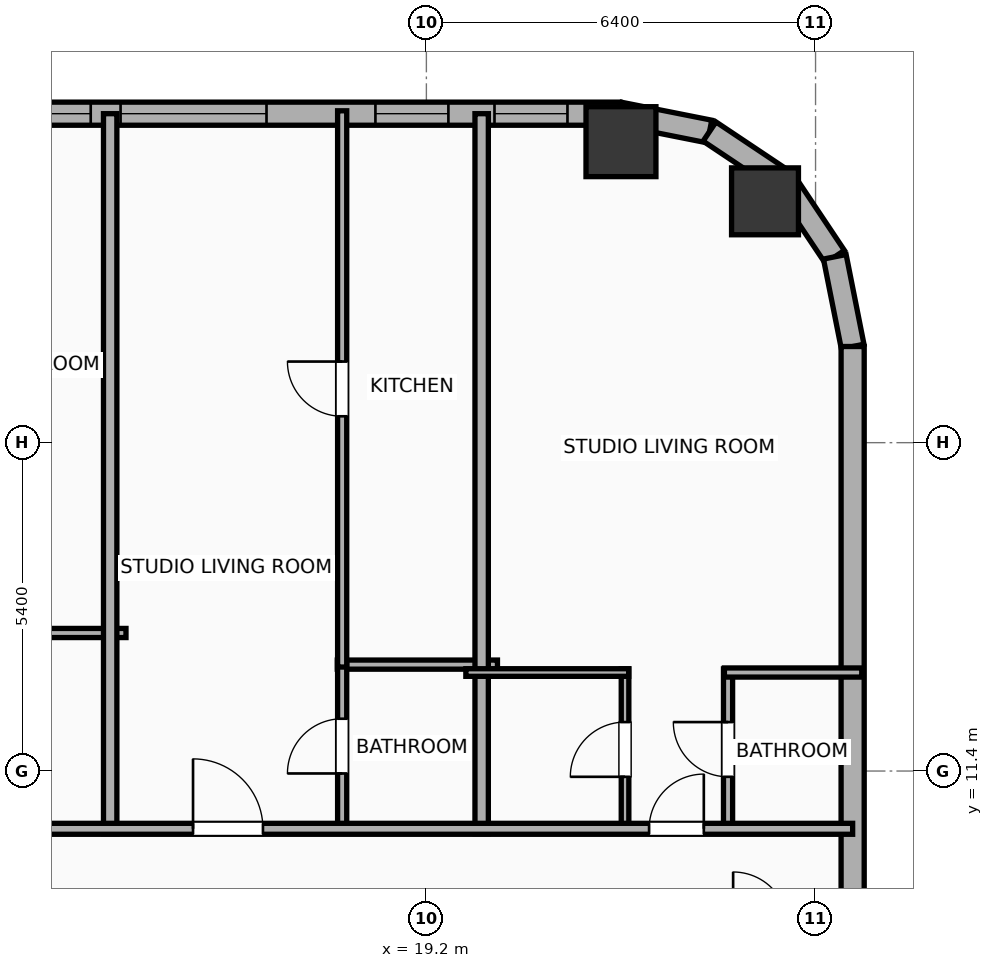
"""IFC4 building model, lengths in metres.
Left out: names, types, materials, properties, quantities, classifications, styles, units other than length and angle.
Written with IfcOpenShell. Run it as: python <this file> out.ifc"""

import sys

from ifc_helpers import new_model, si_unit, direction, frame, frame_2d, origin, origin_2d, place, context, subcontext, project, spatial, rectangle, hollow_rectangle, hollow_circle, extrude, element, fill, save


model = new_model("IFC4")
c1 = context("Model", 3, precision=1e-05, world=origin(), true_north=direction((0.0, 1.0)))
c2 = subcontext(c1, "Body", "Model", "MODEL_VIEW")
j1 = project(units=[si_unit("LENGTHUNIT", "METRE"), si_unit("PLANEANGLEUNIT", "RADIAN")], contexts=[c1])
p1 = place(None, origin())
s1 = spatial("IfcSite", under=j1, at=p1, CompositionType="ELEMENT")
p2 = place(p1, origin())
s2 = spatial("IfcBuilding", under=s1, at=p2, CompositionType="ELEMENT")
p3 = place(p2, frame((0.0, 0.0, 72.8)))
s3 = spatial("IfcBuildingStorey", under=s2, at=p3, CompositionType="ELEMENT", Elevation=72.8)
p4 = place(p3, frame((24.769, 20.769, 0.0), z_axis=(0.0, 0.0, 1.0), x_axis=(1.0, 0.0, 0.0)))
e1 = element("IfcColumn", 1, at=p4, inside=s3, PredefinedType="COLUMN", context=c2, shape_type="SweptSolid", body=[
    extrude(hollow_circle(Radius=0.55, WallThickness=0.036, at=origin_2d()), origin(), (0.0, 0.0, 1.0), 3.9),
])
p5 = place(p3, frame((22.4, 21.75, 0.0), z_axis=(0.0, 0.0, 1.0), x_axis=(1.0, 0.0, 0.0)))
e2 = element("IfcColumn", 2, at=p5, inside=s3, PredefinedType="COLUMN", context=c2, shape_type="SweptSolid", body=[
    extrude(hollow_rectangle(XDim=1.15, YDim=1.15, WallThickness=0.04, at=origin_2d()), origin(), (0.0, 0.0, 1.0), 3.9),
])
p6 = place(p3, frame((-29.581, 22.21, 0.0), z_axis=(0.0, 0.0, 1.0), x_axis=(1.0, 0.0, 0.0)))
e3 = element("IfcWall", 3, at=p6, inside=s3, PredefinedType="ELEMENTEDWALL", context=c2, shape_type="SweptSolid", body=[
    extrude(rectangle(XDim=51.963, YDim=0.38, at=frame_2d((25.981, 0.0))), origin(), (0.0, 0.0, 1.0), 3.65),
])
p7 = place(p6, frame((5.81, 0.0, 0.75)))
e4 = element("IfcOpeningElement", 4, at=p7, cuts=e3, PredefinedType="OPENING", context=c2, shape_type="SweptSolid", body=[
    extrude(rectangle(XDim=2.4, YDim=2.1, at=frame_2d((1.2, 1.05))), frame((0.0, 0.2, 0.0), z_axis=(0.0, -1.0, 0.0), x_axis=(1.0, 0.0, 0.0)), (0.0, 0.0, 1.0), 0.4),
])
p8 = place(p6, frame((23.131, 0.0, 0.75)))
e5 = element("IfcOpeningElement", 5, at=p8, cuts=e3, PredefinedType="OPENING", context=c2, shape_type="SweptSolid", body=[
    extrude(rectangle(XDim=2.4, YDim=2.1, at=frame_2d((1.2, 1.05))), frame((0.0, 0.2, 0.0), z_axis=(0.0, -1.0, 0.0), x_axis=(1.0, 0.0, 0.0)), (0.0, 0.0, 1.0), 0.4),
])
p9 = place(p6, frame((43.752, 0.0, 0.75)))
e6 = element("IfcOpeningElement", 6, at=p9, cuts=e3, PredefinedType="OPENING", context=c2, shape_type="SweptSolid", body=[
    extrude(rectangle(XDim=2.4, YDim=2.1, at=frame_2d((1.2, 1.05))), frame((0.0, 0.2, 0.0), z_axis=(0.0, -1.0, 0.0), x_axis=(1.0, 0.0, 0.0)), (0.0, 0.0, 1.0), 0.4),
])
p10 = place(p6, frame((2.819, 0.0, 0.75)))
e7 = element("IfcOpeningElement", 7, at=p10, cuts=e3, PredefinedType="OPENING", context=c2, shape_type="SweptSolid", body=[
    extrude(rectangle(XDim=1.2, YDim=2.05, at=frame_2d((0.6, 1.025))), frame((0.0, 0.2, 0.0), z_axis=(0.0, -1.0, 0.0), x_axis=(1.0, 0.0, 0.0)), (0.0, 0.0, 1.0), 0.4),
])
p11 = place(p6, frame((11.781, 0.0, 0.75)))
e8 = element("IfcOpeningElement", 8, at=p11, cuts=e3, PredefinedType="OPENING", context=c2, shape_type="SweptSolid", body=[
    extrude(rectangle(XDim=1.2, YDim=2.05, at=frame_2d((0.6, 1.025))), frame((0.0, 0.2, 0.0), z_axis=(0.0, -1.0, 0.0), x_axis=(1.0, 0.0, 0.0)), (0.0, 0.0, 1.0), 0.4),
])
p12 = place(p6, frame((8.781, 0.0, 0.75)))
e9 = element("IfcOpeningElement", 9, at=p12, cuts=e3, PredefinedType="OPENING", context=c2, shape_type="SweptSolid", body=[
    extrude(rectangle(XDim=0.85, YDim=2.05, at=frame_2d((0.425, 1.025))), frame((0.0, 0.2, 0.0), z_axis=(0.0, -1.0, 0.0), x_axis=(1.0, 0.0, 0.0)), (0.0, 0.0, 1.0), 0.4),
])
p13 = place(p6, frame((14.876, 0.0, 0.75)))
e10 = element("IfcOpeningElement", 10, at=p13, cuts=e3, PredefinedType="OPENING", context=c2, shape_type="SweptSolid", body=[
    extrude(rectangle(XDim=1.2, YDim=2.05, at=frame_2d((0.6, 1.025))), frame((0.0, 0.2, 0.0), z_axis=(0.0, -1.0, 0.0), x_axis=(1.0, 0.0, 0.0)), (0.0, 0.0, 1.0), 0.4),
])
p14 = place(p6, frame((21.521, 0.0, 0.75)))
e11 = element("IfcOpeningElement", 11, at=p14, cuts=e3, PredefinedType="OPENING", context=c2, shape_type="SweptSolid", body=[
    extrude(rectangle(XDim=0.52, YDim=2.05, at=frame_2d((0.26, 1.025))), frame((0.0, 0.2, 0.0), z_axis=(0.0, -1.0, 0.0), x_axis=(1.0, 0.0, 0.0)), (0.0, 0.0, 1.0), 0.4),
])
p15 = place(p6, frame((17.886, 0.0, 0.75)))
e12 = element("IfcOpeningElement", 12, at=p15, cuts=e3, PredefinedType="OPENING", context=c2, shape_type="SweptSolid", body=[
    extrude(rectangle(XDim=1.2, YDim=2.05, at=frame_2d((0.6, 1.025))), frame((0.0, 0.2, 0.0), z_axis=(0.0, -1.0, 0.0), x_axis=(1.0, 0.0, 0.0)), (0.0, 0.0, 1.0), 0.4),
])
p16 = place(p6, frame((26.736, 0.0, 0.75)))
e13 = element("IfcOpeningElement", 13, at=p16, cuts=e3, PredefinedType="OPENING", context=c2, shape_type="SweptSolid", body=[
    extrude(rectangle(XDim=1.2, YDim=2.05, at=frame_2d((0.6, 1.025))), frame((0.0, 0.2, 0.0), z_axis=(0.0, -1.0, 0.0), x_axis=(1.0, 0.0, 0.0)), (0.0, 0.0, 1.0), 0.4),
])
p17 = place(p6, frame((31.976, 0.0, 0.75)))
e14 = element("IfcOpeningElement", 14, at=p17, cuts=e3, PredefinedType="OPENING", context=c2, shape_type="SweptSolid", body=[
    extrude(rectangle(XDim=1.2, YDim=2.05, at=frame_2d((0.6, 1.025))), frame((0.0, 0.2, 0.0), z_axis=(0.0, -1.0, 0.0), x_axis=(1.0, 0.0, 0.0)), (0.0, 0.0, 1.0), 0.4),
])
p18 = place(p6, frame((38.181, 0.0, 0.75)))
e15 = element("IfcOpeningElement", 15, at=p18, cuts=e3, PredefinedType="OPENING", context=c2, shape_type="SweptSolid", body=[
    extrude(rectangle(XDim=1.2, YDim=2.05, at=frame_2d((0.6, 1.025))), frame((0.0, 0.2, 0.0), z_axis=(0.0, -1.0, 0.0), x_axis=(1.0, 0.0, 0.0)), (0.0, 0.0, 1.0), 0.4),
])
p19 = place(p6, frame((35.486, 0.0, 0.75)))
e16 = element("IfcOpeningElement", 16, at=p19, cuts=e3, PredefinedType="OPENING", context=c2, shape_type="SweptSolid", body=[
    extrude(rectangle(XDim=1.2, YDim=2.05, at=frame_2d((0.6, 1.025))), frame((0.0, 0.2, 0.0), z_axis=(0.0, -1.0, 0.0), x_axis=(1.0, 0.0, 0.0)), (0.0, 0.0, 1.0), 0.4),
])
p20 = place(p6, frame((42.411, 0.0, 0.75)))
e17 = element("IfcOpeningElement", 17, at=p20, cuts=e3, PredefinedType="OPENING", context=c2, shape_type="SweptSolid", body=[
    extrude(rectangle(XDim=0.85, YDim=2.05, at=frame_2d((0.425, 1.025))), frame((0.0, 0.2, 0.0), z_axis=(0.0, -1.0, 0.0), x_axis=(1.0, 0.0, 0.0)), (0.0, 0.0, 1.0), 0.4),
])
p21 = place(p6, frame((47.943, 0.0, 0.75)))
e18 = element("IfcOpeningElement", 18, at=p21, cuts=e3, PredefinedType="OPENING", context=c2, shape_type="SweptSolid", body=[
    extrude(rectangle(XDim=1.2, YDim=2.05, at=frame_2d((0.6, 1.025))), frame((0.0, 0.2, 0.0), z_axis=(0.0, -1.0, 0.0), x_axis=(1.0, 0.0, 0.0)), (0.0, 0.0, 1.0), 0.4),
])
p22 = place(p6, frame((49.901, 0.0, 0.75)))
e19 = element("IfcOpeningElement", 19, at=p22, cuts=e3, PredefinedType="OPENING", context=c2, shape_type="SweptSolid", body=[
    extrude(rectangle(XDim=1.2, YDim=2.05, at=frame_2d((0.6, 1.025))), frame((0.0, 0.2, 0.0), z_axis=(0.0, -1.0, 0.0), x_axis=(1.0, 0.0, 0.0)), (0.0, 0.0, 1.0), 0.4),
])
p23 = place(p3, frame((22.381, 22.21, 0.0), z_axis=(0.0, 0.0, 1.0), x_axis=(0.980786132421, -0.195086038585, 0.0)))
e20 = element("IfcWall", 20, at=p23, inside=s3, PredefinedType="ELEMENTEDWALL", context=c2, shape_type="SweptSolid", body=[
    extrude(rectangle(XDim=1.504, YDim=0.38, at=frame_2d((0.752, 0.0))), origin(), (0.0, 0.0, 1.0), 3.65),
])
for number, where, z_axis, x_axis in (
    (21, (23.857, 21.917, 0.0), (0.0, 0.0, 1.0), (0.831, -0.556, 0.0)),
    (22, (25.091, 21.091, 0.0), (0.0, 0.0, 1.0), (0.556, -0.831, 0.0)),
):
    element("IfcWall", number, at=place(p3, frame(where, z_axis=z_axis, x_axis=x_axis)), inside=s3, PredefinedType="ELEMENTEDWALL", context=c2, shape_type="SweptSolid", body=[
        extrude(rectangle(XDim=1.485, YDim=0.38, at=frame_2d((0.743, 0.0))), origin(), (0.0, 0.0, 1.0), 3.65),
    ])
p24 = place(p3, frame((25.917, 19.857, 0.0), z_axis=(0.0, 0.0, 1.0), x_axis=(0.195086038585, -0.980786132421, 0.0)))
e23 = element("IfcWall", 23, at=p24, inside=s3, PredefinedType="ELEMENTEDWALL", context=c2, shape_type="SweptSolid", body=[
    extrude(rectangle(XDim=1.504, YDim=0.38, at=frame_2d((0.752, 0.0))), origin(), (0.0, 0.0, 1.0), 3.65),
])
p25 = place(p3, frame((26.21, 18.381, 0.0), z_axis=(0.0, 0.0, 1.0), x_axis=(0.0, -1.0, 0.0)))
e24 = element("IfcWall", 24, at=p25, inside=s3, PredefinedType="ELEMENTEDWALL", context=c2, shape_type="SweptSolid", body=[
    extrude(rectangle(XDim=36.763, YDim=0.38, at=frame_2d((18.381, 0.0))), origin(), (0.0, 0.0, 1.0), 3.65),
])
p26 = place(p25, frame((33.362, 0.0, 0.75)))
e25 = element("IfcOpeningElement", 25, at=p26, cuts=e24, PredefinedType="OPENING", context=c2, shape_type="SweptSolid", body=[
    extrude(rectangle(XDim=1.2, YDim=2.05, at=frame_2d((0.6, 1.025))), frame((0.0, 0.2, 0.0), z_axis=(0.0, -1.0, 0.0), x_axis=(1.0, 0.0, 0.0)), (0.0, 0.0, 1.0), 0.4),
])
p27 = place(p3, frame((10.47, 13.67, 0.0), z_axis=(0.0, 0.0, 1.0), x_axis=(1.0, 0.0, 0.0)))
e26 = element("IfcWall", 26, at=p27, inside=s3, PredefinedType="PLUMBINGWALL", context=c2, shape_type="SweptSolid", body=[
    extrude(rectangle(XDim=3.79, YDim=0.15, at=frame_2d((1.895, 0.0))), origin(), (0.0, 0.0, 1.0), 3.65),
])
p28 = place(p3, frame((14.0, 10.37, 0.0), z_axis=(0.0, 0.0, 1.0), x_axis=(0.0, 1.0, 0.0)))
e27 = element("IfcWall", 27, at=p28, inside=s3, PredefinedType="PARTITIONING", context=c2, shape_type="SweptSolid", body=[
    extrude(rectangle(XDim=11.84, YDim=0.22, at=frame_2d((5.92, 0.0))), origin(), (0.0, 0.0, 1.0), 3.65),
])
p29 = place(p3, frame((17.735, 13.15, 0.0), z_axis=(0.0, 0.0, 1.0), x_axis=(1.0, 0.0, 0.0)))
e28 = element("IfcWall", 28, at=p29, inside=s3, PredefinedType="PLUMBINGWALL", context=c2, shape_type="SweptSolid", body=[
    extrude(rectangle(XDim=2.634, YDim=0.15, at=frame_2d((1.317, 0.0))), origin(), (0.0, 0.0, 1.0), 3.65),
])
p30 = place(p3, frame((17.815, 10.43, 0.0), z_axis=(0.0, 0.0, 1.0), x_axis=(0.0, 1.0, 0.0)))
e29 = element("IfcWall", 29, at=p30, inside=s3, PredefinedType="PLUMBINGWALL", context=c2, shape_type="SweptSolid", body=[
    extrude(rectangle(XDim=2.76, YDim=0.15, at=frame_2d((1.38, 0.0))), origin(), (0.0, 0.0, 1.0), 3.65),
])
p31 = place(p30, frame((0.93, 0.0, 0.0)))
e30 = element("IfcOpeningElement", 30, at=p31, cuts=e29, PredefinedType="OPENING", context=c2, shape_type="SweptSolid", body=[
    extrude(rectangle(XDim=0.9, YDim=2.05, at=frame_2d((0.45, 1.025))), frame((0.0, 0.085, 0.0), z_axis=(0.0, -1.0, 0.0), x_axis=(1.0, 0.0, 0.0)), (0.0, 0.0, 1.0), 0.17),
])
p32 = place(p3, frame((17.815, 13.11, 0.0), z_axis=(0.0, 0.0, 1.0), x_axis=(0.0, 1.0, 0.0)))
e31 = element("IfcWall", 31, at=p32, inside=s3, PredefinedType="PLUMBINGWALL", context=c2, shape_type="SweptSolid", body=[
    extrude(rectangle(XDim=9.147, YDim=0.15, at=frame_2d((4.574, 0.0))), origin(), (0.0, 0.0, 1.0), 3.65),
])
p33 = place(p32, frame((4.124, 0.0, 0.0)))
e32 = element("IfcOpeningElement", 32, at=p33, cuts=e31, PredefinedType="OPENING", context=c2, shape_type="SweptSolid", body=[
    extrude(rectangle(XDim=0.9, YDim=2.05, at=frame_2d((0.45, 1.025))), frame((0.0, 0.085, 0.0), z_axis=(0.0, -1.0, 0.0), x_axis=(1.0, 0.0, 0.0)), (0.0, 0.0, 1.0), 0.17),
])
p34 = place(p3, frame((20.109, 10.37, 0.0), z_axis=(0.0, 0.0, 1.0), x_axis=(0.0, 1.0, 0.0)))
e33 = element("IfcWall", 33, at=p34, inside=s3, PredefinedType="PARTITIONING", context=c2, shape_type="SweptSolid", body=[
    extrude(rectangle(XDim=11.84, YDim=0.22, at=frame_2d((5.92, 0.0))), origin(), (0.0, 0.0, 1.0), 3.65),
])
p35 = place(p3, frame((22.467, 10.43, 0.0), z_axis=(0.0, 0.0, 1.0), x_axis=(0.0, 1.0, 0.0)))
e34 = element("IfcWall", 34, at=p35, inside=s3, PredefinedType="PARTITIONING", context=c2, shape_type="SweptSolid", body=[
    extrude(rectangle(XDim=2.65, YDim=0.125, at=frame_2d((1.325, 0.0))), origin(), (0.0, 0.0, 1.0), 3.65),
])
p36 = place(p35, frame((0.875, 0.0, 0.0)))
e35 = element("IfcOpeningElement", 35, at=p36, cuts=e34, PredefinedType="OPENING", context=c2, shape_type="SweptSolid", body=[
    extrude(rectangle(XDim=0.9, YDim=2.05, at=frame_2d((0.45, 1.025))), frame((0.0, 0.073, 0.0), z_axis=(0.0, -1.0, 0.0), x_axis=(1.0, 0.0, 0.0)), (0.0, 0.0, 1.0), 0.145),
])
p37 = place(p3, frame((24.161, 10.43, 0.0), z_axis=(0.0, 0.0, 1.0), x_axis=(0.0, 1.0, 0.0)))
e36 = element("IfcWall", 36, at=p37, inside=s3, PredefinedType="PLUMBINGWALL", context=c2, shape_type="SweptSolid", body=[
    extrude(rectangle(XDim=2.65, YDim=0.15, at=frame_2d((1.325, 0.0))), origin(), (0.0, 0.0, 1.0), 3.65),
])
p38 = place(p37, frame((0.875, 0.0, 0.0)))
e37 = element("IfcOpeningElement", 37, at=p38, cuts=e36, PredefinedType="OPENING", context=c2, shape_type="SweptSolid", body=[
    extrude(rectangle(XDim=0.9, YDim=2.05, at=frame_2d((0.45, 1.025))), frame((0.0, 0.085, 0.0), z_axis=(0.0, -1.0, 0.0), x_axis=(1.0, 0.0, 0.0)), (0.0, 0.0, 1.0), 0.17),
])
p39 = place(p3, frame((19.849, 13.02, 0.0), z_axis=(0.0, 0.0, 1.0), x_axis=(1.0, 0.0, 0.0)))
e38 = element("IfcWall", 38, at=p39, inside=s3, PredefinedType="PARTITIONING", context=c2, shape_type="SweptSolid", body=[
    extrude(rectangle(XDim=2.678, YDim=0.125, at=frame_2d((1.339, 0.0))), origin(), (0.0, 0.0, 1.0), 3.65),
])
p40 = place(p3, frame((24.101, 13.02, 0.0), z_axis=(0.0, 0.0, 1.0), x_axis=(1.0, 0.0, 0.0)))
e39 = element("IfcWall", 39, at=p40, inside=s3, PredefinedType="PLUMBINGWALL", context=c2, shape_type="SweptSolid", body=[
    extrude(rectangle(XDim=2.259, YDim=0.15, at=frame_2d((1.129, 0.0))), origin(), (0.0, 0.0, 1.0), 3.65),
])
p41 = place(p3, frame((-33.41, 10.45, 0.0), z_axis=(0.0, 0.0, 1.0), x_axis=(1.0, 0.0, 0.0)))
e40 = element("IfcWall", 40, at=p41, inside=s3, PredefinedType="PARTITIONING", context=c2, shape_type="SweptSolid", body=[
    extrude(rectangle(XDim=59.62, YDim=0.18, at=frame_2d((29.81, 0.0))), origin(), (0.0, 0.0, 1.0), 3.65),
])
p42 = place(p41, frame((2.686, 0.0, 0.0)))
e41 = element("IfcOpeningElement", 41, at=p42, cuts=e40, PredefinedType="OPENING", context=c2, shape_type="SweptSolid", body=[
    extrude(rectangle(XDim=0.9, YDim=2.05, at=frame_2d((0.45, 1.025))), frame((0.0, 0.1, 0.0), z_axis=(0.0, -1.0, 0.0), x_axis=(1.0, 0.0, 0.0)), (0.0, 0.0, 1.0), 0.2),
])
p43 = place(p41, frame((9.698, 0.0, 0.0)))
e42 = element("IfcOpeningElement", 42, at=p43, cuts=e40, PredefinedType="OPENING", context=c2, shape_type="SweptSolid", body=[
    extrude(rectangle(XDim=1.15, YDim=2.05, at=frame_2d((0.575, 1.025))), frame((0.0, 0.1, 0.0), z_axis=(0.0, -1.0, 0.0), x_axis=(1.0, 0.0, 0.0)), (0.0, 0.0, 1.0), 0.2),
])
p44 = place(p41, frame((16.22, 0.0, 0.0)))
e43 = element("IfcOpeningElement", 43, at=p44, cuts=e40, PredefinedType="OPENING", context=c2, shape_type="SweptSolid", body=[
    extrude(rectangle(XDim=1.15, YDim=2.05, at=frame_2d((0.575, 1.025))), frame((0.0, 0.1, 0.0), z_axis=(0.0, -1.0, 0.0), x_axis=(1.0, 0.0, 0.0)), (0.0, 0.0, 1.0), 0.2),
])
p45 = place(p41, frame((25.073, 0.0, 0.0)))
e44 = element("IfcOpeningElement", 44, at=p45, cuts=e40, PredefinedType="OPENING", context=c2, shape_type="SweptSolid", body=[
    extrude(rectangle(XDim=1.15, YDim=2.05, at=frame_2d((0.575, 1.025))), frame((0.0, 0.1, 0.0), z_axis=(0.0, -1.0, 0.0), x_axis=(1.0, 0.0, 0.0)), (0.0, 0.0, 1.0), 0.2),
])
p46 = place(p41, frame((33.605, 0.0, 0.0)))
e45 = element("IfcOpeningElement", 45, at=p46, cuts=e40, PredefinedType="OPENING", context=c2, shape_type="SweptSolid", body=[
    extrude(rectangle(XDim=1.15, YDim=2.05, at=frame_2d((0.575, 1.025))), frame((0.0, 0.1, 0.0), z_axis=(0.0, -1.0, 0.0), x_axis=(1.0, 0.0, 0.0)), (0.0, 0.0, 1.0), 0.2),
])
p47 = place(p41, frame((42.649, 0.0, 0.0)))
e46 = element("IfcOpeningElement", 46, at=p47, cuts=e40, PredefinedType="OPENING", context=c2, shape_type="SweptSolid", body=[
    extrude(rectangle(XDim=1.15, YDim=2.05, at=frame_2d((0.575, 1.025))), frame((0.0, 0.1, 0.0), z_axis=(0.0, -1.0, 0.0), x_axis=(1.0, 0.0, 0.0)), (0.0, 0.0, 1.0), 0.2),
])
p48 = place(p41, frame((48.772, 0.0, 0.0)))
e47 = element("IfcOpeningElement", 47, at=p48, cuts=e40, PredefinedType="OPENING", context=c2, shape_type="SweptSolid", body=[
    extrude(rectangle(XDim=1.15, YDim=2.05, at=frame_2d((0.575, 1.025))), frame((0.0, 0.1, 0.0), z_axis=(0.0, -1.0, 0.0), x_axis=(1.0, 0.0, 0.0)), (0.0, 0.0, 1.0), 0.2),
])
p49 = place(p41, frame((56.272, 0.0, 0.0)))
e48 = element("IfcOpeningElement", 48, at=p49, cuts=e40, PredefinedType="OPENING", context=c2, shape_type="SweptSolid", body=[
    extrude(rectangle(XDim=0.9, YDim=2.05, at=frame_2d((0.45, 1.025))), frame((0.0, 0.1, 0.0), z_axis=(0.0, -1.0, 0.0), x_axis=(1.0, 0.0, 0.0)), (0.0, 0.0, 1.0), 0.2),
])
p50 = place(p9, origin())
e49 = element("IfcWindow", 49, at=p50, inside=s3, PartitioningType="SINGLE_PANEL", PredefinedType="WINDOW", context=c2, shape_type="SweptSolid", body=[
    extrude(rectangle(XDim=2.4, YDim=2.1, at=frame_2d((1.2, 1.05))), frame((0.0, 0.03, 0.0), z_axis=(0.0, -1.0, 0.0), x_axis=(1.0, 0.0, 0.0)), (0.0, 0.0, 1.0), 0.06),
])
fill(e6, e49)
p51 = place(p20, origin())
e50 = element("IfcWindow", 50, at=p51, inside=s3, PartitioningType="SINGLE_PANEL", PredefinedType="WINDOW", context=c2, shape_type="SweptSolid", body=[
    extrude(rectangle(XDim=0.85, YDim=2.05, at=frame_2d((0.425, 1.025))), frame((0.0, 0.03, 0.0), z_axis=(0.0, -1.0, 0.0), x_axis=(1.0, 0.0, 0.0)), (0.0, 0.0, 1.0), 0.06),
])
fill(e17, e50)
p52 = place(p21, origin())
e51 = element("IfcWindow", 51, at=p52, inside=s3, PartitioningType="SINGLE_PANEL", PredefinedType="WINDOW", context=c2, shape_type="SweptSolid", body=[
    extrude(rectangle(XDim=1.2, YDim=2.05, at=frame_2d((0.6, 1.025))), frame((0.0, 0.03, 0.0), z_axis=(0.0, -1.0, 0.0), x_axis=(1.0, 0.0, 0.0)), (0.0, 0.0, 1.0), 0.06),
])
fill(e18, e51)
p53 = place(p22, origin())
e52 = element("IfcWindow", 52, at=p53, inside=s3, PartitioningType="SINGLE_PANEL", PredefinedType="WINDOW", context=c2, shape_type="SweptSolid", body=[
    extrude(rectangle(XDim=1.2, YDim=2.05, at=frame_2d((0.6, 1.025))), frame((0.0, 0.03, 0.0), z_axis=(0.0, -1.0, 0.0), x_axis=(1.0, 0.0, 0.0)), (0.0, 0.0, 1.0), 0.06),
])
fill(e19, e52)
p54 = place(p31, origin())
e53 = element("IfcDoor", 53, at=p54, inside=s3, OperationType="SINGLE_SWING_LEFT", PredefinedType="DOOR", context=c2, shape_type="SweptSolid", body=[
    extrude(rectangle(XDim=0.9, YDim=2.05, at=frame_2d((0.45, 1.025))), frame((0.0, 0.025, 0.0), z_axis=(0.0, -1.0, 0.0), x_axis=(1.0, 0.0, 0.0)), (0.0, 0.0, 1.0), 0.05),
])
fill(e30, e53)
p55 = place(p33, origin())
e54 = element("IfcDoor", 54, at=p55, inside=s3, OperationType="SINGLE_SWING_RIGHT", PredefinedType="DOOR", context=c2, shape_type="SweptSolid", body=[
    extrude(rectangle(XDim=0.9, YDim=2.05, at=frame_2d((0.45, 1.025))), frame((0.0, 0.025, 0.0), z_axis=(0.0, -1.0, 0.0), x_axis=(1.0, 0.0, 0.0)), (0.0, 0.0, 1.0), 0.05),
])
fill(e32, e54)
p56 = place(p36, origin())
e55 = element("IfcDoor", 55, at=p56, inside=s3, OperationType="SINGLE_SWING_LEFT", PredefinedType="DOOR", context=c2, shape_type="SweptSolid", body=[
    extrude(rectangle(XDim=0.9, YDim=2.05, at=frame_2d((0.45, 1.025))), frame((0.0, 0.025, 0.0), z_axis=(0.0, -1.0, 0.0), x_axis=(1.0, 0.0, 0.0)), (0.0, 0.0, 1.0), 0.05),
])
fill(e35, e55)
p57 = place(p38, origin())
e56 = element("IfcDoor", 56, at=p57, inside=s3, OperationType="SINGLE_SWING_RIGHT", PredefinedType="DOOR", context=c2, shape_type="SweptSolid", body=[
    extrude(rectangle(XDim=0.9, YDim=2.05, at=frame_2d((0.45, 1.025))), frame((0.0, 0.025, 0.0), z_axis=(0.0, -1.0, 0.0), x_axis=(1.0, 0.0, 0.0)), (0.0, 0.0, 1.0), 0.05),
])
fill(e37, e56)
p58 = place(p48, origin())
e57 = element("IfcDoor", 57, at=p58, inside=s3, OperationType="SINGLE_SWING_LEFT", PredefinedType="DOOR", context=c2, shape_type="SweptSolid", body=[
    extrude(rectangle(XDim=1.15, YDim=2.05, at=frame_2d((0.575, 1.025))), frame((0.0, 0.025, 0.0), z_axis=(0.0, -1.0, 0.0), x_axis=(1.0, 0.0, 0.0)), (0.0, 0.0, 1.0), 0.05),
])
fill(e47, e57)
p59 = place(p49, origin())
e58 = element("IfcDoor", 58, at=p59, inside=s3, OperationType="SINGLE_SWING_RIGHT", PredefinedType="DOOR", context=c2, shape_type="SweptSolid", body=[
    extrude(rectangle(XDim=0.9, YDim=2.05, at=frame_2d((0.45, 1.025))), frame((0.0, 0.025, 0.0), z_axis=(0.0, -1.0, 0.0), x_axis=(1.0, 0.0, 0.0)), (0.0, 0.0, 1.0), 0.05),
])
fill(e48, e58)
save(model, sys.argv[1])
